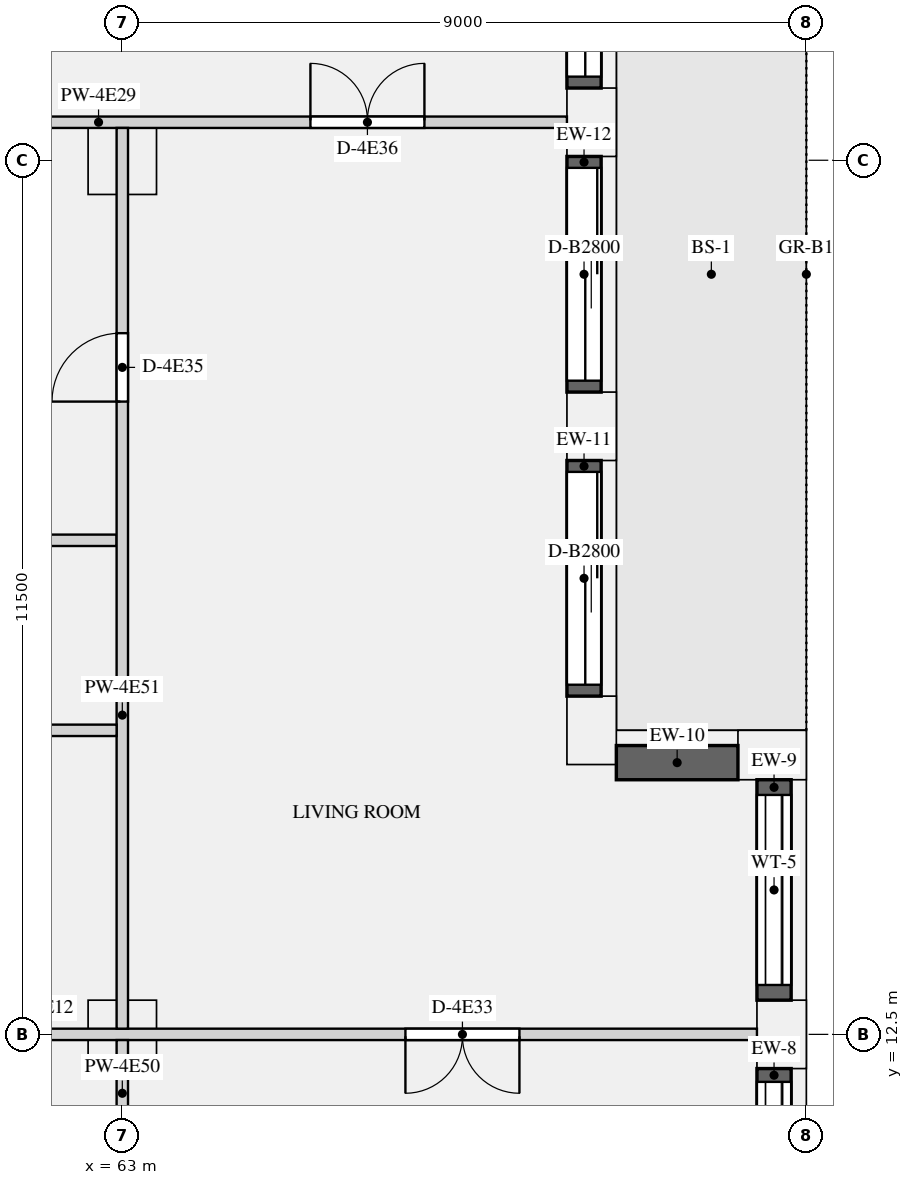
"""IFC4 building model, lengths in metres.
Left out: names, types, materials, properties, quantities, classifications, styles, units other than length and angle.
Written with IfcOpenShell. Run it as: python <this file> out.ifc"""

import sys

from ifc_helpers import new_model, si_unit, direction, frame, frame_2d, origin, origin_2d, place, context, subcontext, project, spatial, rectangle, extrude, element, fill, save


model = new_model("IFC4")
c1 = context("Model", 3, precision=1e-05, world=origin(), true_north=direction((0.0, 1.0)))
c2 = subcontext(c1, "Body", "Model", "MODEL_VIEW")
j1 = project(units=[si_unit("LENGTHUNIT", "METRE"), si_unit("PLANEANGLEUNIT", "RADIAN")], contexts=[c1])
p1 = place(None, origin())
s1 = spatial("IfcSite", under=j1, at=p1, CompositionType="ELEMENT")
p2 = place(p1, origin())
s2 = spatial("IfcBuilding", under=s1, at=p2, CompositionType="ELEMENT")
p3 = place(p2, frame((0.0, 0.0, 229.5)))
s3 = spatial("IfcBuildingStorey", under=s2, at=p3, CompositionType="ELEMENT", Elevation=229.5)
for number, where, z_axis, x_axis in (
    (1, (71.675, 12.5, 0.0), (0.0, 0.0, 1.0), (0.0, 1.0, 0.0)),
    (2, (71.55, 16.175, 0.0), (0.0, 0.0, 1.0), (-1.0, 0.0, 0.0)),
    (3, (69.175, 16.5, 0.0), (0.0, 0.0, 1.0), (0.0, 1.0, 0.0)),
    (4, (69.175, 20.5, 0.0), (0.0, 0.0, 1.0), (0.0, 1.0, 0.0)),
    (5, (69.175, 24.5, 0.0), (0.0, 0.0, 1.0), (0.0, 1.0, 0.0)),
):
    element("IfcColumn", number, at=place(p3, frame(where, z_axis=z_axis, x_axis=x_axis)), inside=s3, PredefinedType="USERDEFINED", context=c2, shape_type="SweptSolid", body=[
        extrude(rectangle(XDim=0.9, YDim=0.65, at=origin_2d()), origin(), (0.0, 0.0, 1.0), 3.15),
    ])
for number, where, z_axis, x_axis in (
    (6, (63.0, 24.0, 0.0), (0.0, 0.0, 1.0), (1.0, 0.0, 0.0)),
    (7, (63.0, 12.5, 0.0), (0.0, 0.0, 1.0), (1.0, 0.0, 0.0)),
):
    element("IfcColumn", number, at=place(p3, frame(where, z_axis=z_axis, x_axis=x_axis)), inside=s3, PredefinedType="COLUMN", context=c2, shape_type="SweptSolid", body=[
        extrude(rectangle(XDim=0.9, YDim=0.9, at=origin_2d()), origin(), (0.0, 0.0, 1.0), 3.15),
    ])
p4 = place(p3, frame((71.575, 8.95, 0.9), z_axis=(0.0, 0.0, 1.0), x_axis=(0.0, 1.0, 0.0)))
e8 = element("IfcWall", 8, at=p4, inside=s3, PredefinedType="SOLIDWALL", context=c2, shape_type="SweptSolid", body=[
    extrude(rectangle(XDim=3.1, YDim=0.45, at=frame_2d((1.55, 0.0))), origin(), (0.0, 0.0, 1.0), 1.93),
])
p5 = place(p4, frame((0.175, 0.0, 0.15)))
e9 = element("IfcOpeningElement", 9, at=p5, cuts=e8, PredefinedType="OPENING", context=c2, shape_type="SweptSolid", body=[
    extrude(rectangle(XDim=2.75, YDim=1.5, at=frame_2d((1.375, 0.75))), frame((0.0, 0.235, 0.0), z_axis=(0.0, -1.0, 0.0), x_axis=(1.0, 0.0, 0.0)), (0.0, 0.0, 1.0), 0.47),
])
p6 = place(p3, frame((71.575, 12.95, 0.9), z_axis=(0.0, 0.0, 1.0), x_axis=(0.0, 1.0, 0.0)))
e10 = element("IfcWall", 10, at=p6, inside=s3, PredefinedType="SOLIDWALL", context=c2, shape_type="SweptSolid", body=[
    extrude(rectangle(XDim=2.9, YDim=0.45, at=frame_2d((1.45, 0.0))), origin(), (0.0, 0.0, 1.0), 1.93),
])
p7 = place(p6, frame((0.2, 0.0, 0.15)))
e11 = element("IfcOpeningElement", 11, at=p7, cuts=e10, PredefinedType="OPENING", context=c2, shape_type="SweptSolid", body=[
    extrude(rectangle(XDim=2.5, YDim=1.5, at=frame_2d((1.25, 0.75))), frame((0.0, 0.235, 0.0), z_axis=(0.0, -1.0, 0.0), x_axis=(1.0, 0.0, 0.0)), (0.0, 0.0, 1.0), 0.47),
])
p8 = place(p3, frame((71.1, 16.075, 0.9), z_axis=(0.0, 0.0, 1.0), x_axis=(-1.0, 0.0, 0.0)))
e12 = element("IfcWall", 12, at=p8, inside=s3, PredefinedType="SOLIDWALL", context=c2, shape_type="SweptSolid", body=[
    extrude(rectangle(XDim=1.6, YDim=0.45, at=frame_2d((0.8, 0.0))), origin(), (0.0, 0.0, 1.0), 1.93),
])
p9 = place(p3, frame((69.075, 16.95, 0.0), z_axis=(0.0, 0.0, 1.0), x_axis=(0.0, 1.0, 0.0)))
e13 = element("IfcWall", 13, at=p9, inside=s3, PredefinedType="SOLIDWALL", context=c2, shape_type="SweptSolid", body=[
    extrude(rectangle(XDim=3.1, YDim=0.45, at=frame_2d((1.55, 0.0))), origin(), (0.0, 0.0, 1.0), 2.83),
])
p10 = place(p9, frame((0.15, 0.0, 0.0)))
e14 = element("IfcOpeningElement", 14, at=p10, cuts=e13, PredefinedType="OPENING", context=c2, shape_type="SweptSolid", body=[
    extrude(rectangle(XDim=2.8, YDim=2.3, at=frame_2d((1.4, 1.15))), frame((0.0, 0.235, 0.0), z_axis=(0.0, -1.0, 0.0), x_axis=(1.0, 0.0, 0.0)), (0.0, 0.0, 1.0), 0.47),
])
p11 = place(p3, frame((69.075, 20.95, 0.0), z_axis=(0.0, 0.0, 1.0), x_axis=(0.0, 1.0, 0.0)))
e15 = element("IfcWall", 15, at=p11, inside=s3, PredefinedType="SOLIDWALL", context=c2, shape_type="SweptSolid", body=[
    extrude(rectangle(XDim=3.1, YDim=0.45, at=frame_2d((1.55, 0.0))), origin(), (0.0, 0.0, 1.0), 2.83),
])
p12 = place(p11, frame((0.15, 0.0, 0.0)))
e16 = element("IfcOpeningElement", 16, at=p12, cuts=e15, PredefinedType="OPENING", context=c2, shape_type="SweptSolid", body=[
    extrude(rectangle(XDim=2.8, YDim=2.3, at=frame_2d((1.4, 1.15))), frame((0.0, 0.235, 0.0), z_axis=(0.0, -1.0, 0.0), x_axis=(1.0, 0.0, 0.0)), (0.0, 0.0, 1.0), 0.47),
])
p13 = place(p3, frame((69.075, 24.95, 0.0), z_axis=(0.0, 0.0, 1.0), x_axis=(0.0, 1.0, 0.0)))
e17 = element("IfcWall", 17, at=p13, inside=s3, PredefinedType="SOLIDWALL", context=c2, shape_type="SweptSolid", body=[
    extrude(rectangle(XDim=3.55, YDim=0.45, at=frame_2d((1.775, 0.0))), origin(), (0.0, 0.0, 1.0), 2.83),
])
p14 = place(p13, frame((0.15, 0.0, 0.0)))
e18 = element("IfcOpeningElement", 18, at=p14, cuts=e17, PredefinedType="OPENING", context=c2, shape_type="SweptSolid", body=[
    extrude(rectangle(XDim=3.25, YDim=2.3, at=frame_2d((1.625, 1.15))), frame((0.0, 0.235, 0.0), z_axis=(0.0, -1.0, 0.0), x_axis=(1.0, 0.0, 0.0)), (0.0, 0.0, 1.0), 0.47),
])
p15 = place(p3, frame((58.575, 16.5, 0.0), z_axis=(0.0, 0.0, 1.0), x_axis=(1.0, 0.0, 0.0)))
e19 = element("IfcWall", 19, at=p15, inside=s3, PredefinedType="PARTITIONING", context=c2, shape_type="SweptSolid", body=[
    extrude(rectangle(XDim=4.35, YDim=0.15, at=frame_2d((2.175, 0.0))), origin(), (0.0, 0.0, 1.0), 2.83),
])
p16 = place(p3, frame((54.0, 12.5, 0.0), z_axis=(0.0, 0.0, 1.0), x_axis=(1.0, 0.0, 0.0)))
e20 = element("IfcWall", 20, at=p16, inside=s3, PredefinedType="PARTITIONING", context=c2, shape_type="SweptSolid", body=[
    extrude(rectangle(XDim=17.35, YDim=0.15, at=frame_2d((8.675, 0.0))), origin(), (0.0, 0.0, 1.0), 2.83),
])
p17 = place(p16, frame((1.5, 0.0, 0.0)))
e21 = element("IfcOpeningElement", 21, at=p17, cuts=e20, PredefinedType="OPENING", context=c2, shape_type="SweptSolid", body=[
    extrude(rectangle(XDim=1.5, YDim=2.1, at=frame_2d((0.75, 1.05))), frame((0.0, 0.085, 0.0), z_axis=(0.0, -1.0, 0.0), x_axis=(1.0, 0.0, 0.0)), (0.0, 0.0, 1.0), 0.17),
])
p18 = place(p16, frame((12.725, 0.0, 0.0)))
e22 = element("IfcOpeningElement", 22, at=p18, cuts=e20, PredefinedType="OPENING", context=c2, shape_type="SweptSolid", body=[
    extrude(rectangle(XDim=1.5, YDim=2.1, at=frame_2d((0.75, 1.05))), frame((0.0, 0.085, 0.0), z_axis=(0.0, -1.0, 0.0), x_axis=(1.0, 0.0, 0.0)), (0.0, 0.0, 1.0), 0.17),
])
p19 = place(p3, frame((58.575, 19.0, 0.0), z_axis=(0.0, 0.0, 1.0), x_axis=(1.0, 0.0, 0.0)))
e23 = element("IfcWall", 23, at=p19, inside=s3, PredefinedType="PARTITIONING", context=c2, shape_type="SweptSolid", body=[
    extrude(rectangle(XDim=4.35, YDim=0.15, at=frame_2d((2.175, 0.0))), origin(), (0.0, 0.0, 1.0), 2.83),
])
p20 = place(p3, frame((59.9, 24.5, 0.0), z_axis=(0.0, 0.0, 1.0), x_axis=(1.0, 0.0, 0.0)))
e24 = element("IfcWall", 24, at=p20, inside=s3, PredefinedType="PARTITIONING", context=c2, shape_type="SweptSolid", body=[
    extrude(rectangle(XDim=8.95, YDim=0.15, at=frame_2d((4.475, 0.0))), origin(), (0.0, 0.0, 1.0), 2.83),
])
p21 = place(p20, frame((5.575, 0.0, 0.0)))
e25 = element("IfcOpeningElement", 25, at=p21, cuts=e24, PredefinedType="OPENING", context=c2, shape_type="SweptSolid", body=[
    extrude(rectangle(XDim=1.5, YDim=2.1, at=frame_2d((0.75, 1.05))), frame((0.0, 0.085, 0.0), z_axis=(0.0, -1.0, 0.0), x_axis=(1.0, 0.0, 0.0)), (0.0, 0.0, 1.0), 0.17),
])
p22 = place(p3, frame((63.0, 8.575, 0.0), z_axis=(0.0, 0.0, 1.0), x_axis=(0.0, 1.0, 0.0)))
e26 = element("IfcWall", 26, at=p22, inside=s3, PredefinedType="PARTITIONING", context=c2, shape_type="SweptSolid", body=[
    extrude(rectangle(XDim=3.85, YDim=0.15, at=frame_2d((1.925, 0.0))), origin(), (0.0, 0.0, 1.0), 2.83),
])
p23 = place(p22, frame((0.95, 0.0, 0.0)))
e27 = element("IfcOpeningElement", 27, at=p23, cuts=e26, PredefinedType="OPENING", context=c2, shape_type="SweptSolid", body=[
    extrude(rectangle(XDim=1.5, YDim=2.1, at=frame_2d((0.75, 1.05))), frame((0.0, 0.085, 0.0), z_axis=(0.0, -1.0, 0.0), x_axis=(1.0, 0.0, 0.0)), (0.0, 0.0, 1.0), 0.17),
])
p24 = place(p3, frame((63.0, 12.575, 0.0), z_axis=(0.0, 0.0, 1.0), x_axis=(0.0, 1.0, 0.0)))
e28 = element("IfcWall", 28, at=p24, inside=s3, PredefinedType="PARTITIONING", context=c2, shape_type="SweptSolid", body=[
    extrude(rectangle(XDim=11.85, YDim=0.15, at=frame_2d((5.925, 0.0))), origin(), (0.0, 0.0, 1.0), 2.83),
])
p25 = place(p24, frame((8.25, 0.0, 0.0)))
e29 = element("IfcOpeningElement", 29, at=p25, cuts=e28, PredefinedType="OPENING", context=c2, shape_type="SweptSolid", body=[
    extrude(rectangle(XDim=0.9, YDim=2.1, at=frame_2d((0.45, 1.05))), frame((0.0, 0.085, 0.0), z_axis=(0.0, -1.0, 0.0), x_axis=(1.0, 0.0, 0.0)), (0.0, 0.0, 1.0), 0.17),
])
p26 = place(p5, origin())
e30 = element("IfcWindow", 30, at=p26, inside=s3, PartitioningType="SINGLE_PANEL", PredefinedType="WINDOW", context=c2, shape_type="SweptSolid", body=[
    extrude(rectangle(XDim=2.75, YDim=1.5, at=frame_2d((1.375, 0.75))), frame((0.0, -0.065, 0.0), z_axis=(0.0, -1.0, 0.0), x_axis=(1.0, 0.0, 0.0)), (0.0, 0.0, 1.0), 0.06),
])
fill(e9, e30)
p27 = place(p7, origin())
e31 = element("IfcWindow", 31, at=p27, inside=s3, PartitioningType="SINGLE_PANEL", PredefinedType="WINDOW", context=c2, shape_type="SweptSolid", body=[
    extrude(rectangle(XDim=2.5, YDim=1.5, at=frame_2d((1.25, 0.75))), frame((0.0, -0.065, 0.0), z_axis=(0.0, -1.0, 0.0), x_axis=(1.0, 0.0, 0.0)), (0.0, 0.0, 1.0), 0.06),
])
fill(e11, e31)
p28 = place(p10, origin())
e32 = element("IfcDoor", 32, at=p28, inside=s3, OperationType="SLIDING_TO_LEFT", PredefinedType="DOOR", context=c2, shape_type="SweptSolid", body=[
    extrude(rectangle(XDim=2.8, YDim=2.3, at=frame_2d((1.4, 1.15))), frame((0.0, -0.07, 0.0), z_axis=(0.0, -1.0, 0.0), x_axis=(1.0, 0.0, 0.0)), (0.0, 0.0, 1.0), 0.05),
])
fill(e14, e32)
p29 = place(p12, origin())
e33 = element("IfcDoor", 33, at=p29, inside=s3, OperationType="SLIDING_TO_LEFT", PredefinedType="DOOR", context=c2, shape_type="SweptSolid", body=[
    extrude(rectangle(XDim=2.8, YDim=2.3, at=frame_2d((1.4, 1.15))), frame((0.0, -0.07, 0.0), z_axis=(0.0, -1.0, 0.0), x_axis=(1.0, 0.0, 0.0)), (0.0, 0.0, 1.0), 0.05),
])
fill(e16, e33)
p30 = place(p14, origin())
e34 = element("IfcDoor", 34, at=p30, inside=s3, OperationType="SLIDING_TO_LEFT", PredefinedType="DOOR", context=c2, shape_type="SweptSolid", body=[
    extrude(rectangle(XDim=3.25, YDim=2.3, at=frame_2d((1.625, 1.15))), frame((0.0, -0.07, 0.0), z_axis=(0.0, -1.0, 0.0), x_axis=(1.0, 0.0, 0.0)), (0.0, 0.0, 1.0), 0.05),
])
fill(e18, e34)
p31 = place(p18, frame((1.5, 0.0, 0.0), z_axis=(0.0, 0.0, 1.0), x_axis=(-1.0, 0.0, 0.0)))
e35 = element("IfcDoor", 35, at=p31, inside=s3, OperationType="DOUBLE_DOOR_SINGLE_SWING", PredefinedType="DOOR", context=c2, shape_type="SweptSolid", body=[
    extrude(rectangle(XDim=1.5, YDim=2.1, at=frame_2d((0.75, 1.05))), frame((0.0, 0.025, 0.0), z_axis=(0.0, -1.0, 0.0), x_axis=(1.0, 0.0, 0.0)), (0.0, 0.0, 1.0), 0.05),
])
fill(e22, e35)
p32 = place(p25, origin())
e36 = element("IfcDoor", 36, at=p32, inside=s3, OperationType="SINGLE_SWING_LEFT", PredefinedType="DOOR", context=c2, shape_type="SweptSolid", body=[
    extrude(rectangle(XDim=0.9, YDim=2.1, at=frame_2d((0.45, 1.05))), frame((0.0, 0.025, 0.0), z_axis=(0.0, -1.0, 0.0), x_axis=(1.0, 0.0, 0.0)), (0.0, 0.0, 1.0), 0.05),
])
fill(e29, e36)
p33 = place(p21, origin())
e37 = element("IfcDoor", 37, at=p33, inside=s3, OperationType="DOUBLE_DOOR_SINGLE_SWING", PredefinedType="DOOR", context=c2, shape_type="SweptSolid", body=[
    extrude(rectangle(XDim=1.5, YDim=2.1, at=frame_2d((0.75, 1.05))), frame((0.0, 0.025, 0.0), z_axis=(0.0, -1.0, 0.0), x_axis=(1.0, 0.0, 0.0)), (0.0, 0.0, 1.0), 0.05),
])
fill(e25, e37)
save(model, sys.argv[1])
